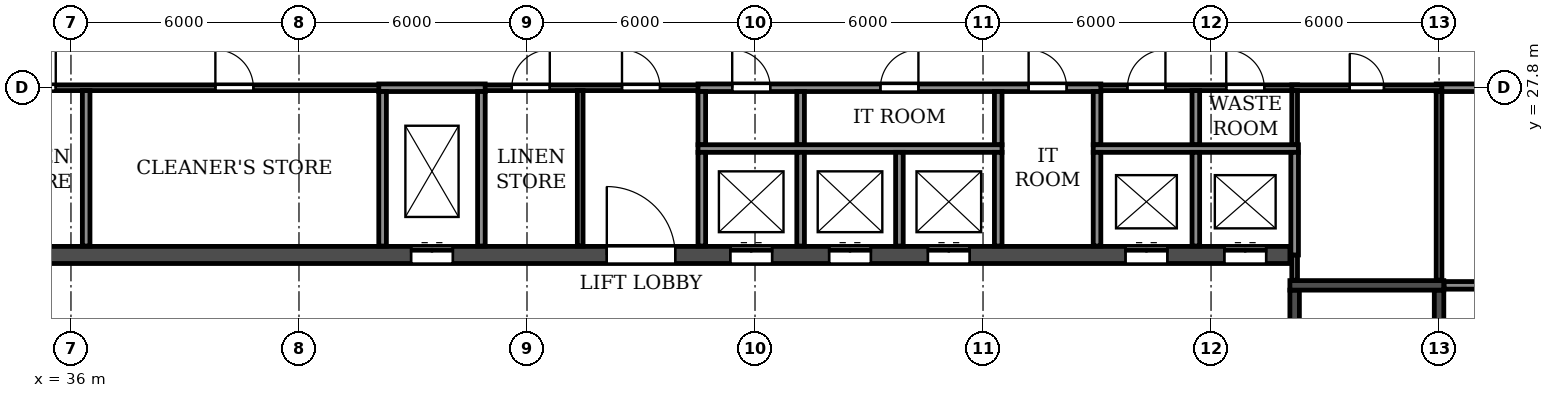
"""IFC4 building model, lengths in metres.
Left out: names, types, materials, properties, quantities, classifications, styles, units other than length and angle.
Written with IfcOpenShell. Run it as: python <this file> out.ifc"""

import sys

from ifc_helpers import new_model, si_unit, direction, frame, frame_2d, origin, place, context, subcontext, project, spatial, rectangle, extrude, element, fill, save


model = new_model("IFC4")
c1 = context("Model", 3, precision=1e-05, world=origin(), true_north=direction((0.0, 1.0)))
c2 = subcontext(c1, "Body", "Model", "MODEL_VIEW")
j1 = project(units=[si_unit("LENGTHUNIT", "METRE"), si_unit("PLANEANGLEUNIT", "RADIAN")], contexts=[c1])
p1 = place(None, origin())
s1 = spatial("IfcSite", under=j1, at=p1, CompositionType="ELEMENT")
p2 = place(p1, origin())
s2 = spatial("IfcBuilding", under=s1, at=p2, CompositionType="ELEMENT")
p3 = place(p2, origin())
s3 = spatial("IfcBuildingStorey", under=s2, at=p3, CompositionType="ELEMENT", Elevation=0.0)
p4 = place(p3, frame((33.925, 23.4, 0.0), z_axis=(0.0, 0.0, 1.0), x_axis=(1.0, 0.0, 0.0)))
e1 = element("IfcWall", 1, at=p4, inside=s3, PredefinedType="SOLIDWALL", context=c2, shape_type="SweptSolid", body=[
    extrude(rectangle(XDim=34.15, YDim=0.45, at=frame_2d((17.075, 0.0))), origin(), (0.0, 0.0, 1.0), 4.2),
])
p5 = place(p4, frame((16.175, 0.0, 0.0)))
e2 = element("IfcOpeningElement", 2, at=p5, cuts=e1, PredefinedType="OPENING", context=c2, shape_type="SweptSolid", body=[
    extrude(rectangle(XDim=1.8, YDim=2.1, at=frame_2d((0.9, 1.05))), frame((0.0, 0.235, 0.0), z_axis=(0.0, -1.0, 0.0), x_axis=(1.0, 0.0, 0.0)), (0.0, 0.0, 1.0), 0.47),
])
p6 = place(p4, frame((11.025, 0.0, 0.0)))
e3 = element("IfcOpeningElement", 3, at=p6, cuts=e1, PredefinedType="OPENING", context=c2, shape_type="SweptSolid", body=[
    extrude(rectangle(XDim=1.1, YDim=2.1, at=frame_2d((0.55, 1.05))), frame((0.0, 0.235, 0.0), z_axis=(0.0, -1.0, 0.0), x_axis=(1.0, 0.0, 0.0)), (0.0, 0.0, 1.0), 0.47),
])
p7 = place(p4, frame((19.425, 0.0, 0.0)))
e4 = element("IfcOpeningElement", 4, at=p7, cuts=e1, PredefinedType="OPENING", context=c2, shape_type="SweptSolid", body=[
    extrude(rectangle(XDim=1.1, YDim=2.1, at=frame_2d((0.55, 1.05))), frame((0.0, 0.235, 0.0), z_axis=(0.0, -1.0, 0.0), x_axis=(1.0, 0.0, 0.0)), (0.0, 0.0, 1.0), 0.47),
])
p8 = place(p4, frame((22.025, 0.0, 0.0)))
e5 = element("IfcOpeningElement", 5, at=p8, cuts=e1, PredefinedType="OPENING", context=c2, shape_type="SweptSolid", body=[
    extrude(rectangle(XDim=1.1, YDim=2.1, at=frame_2d((0.55, 1.05))), frame((0.0, 0.235, 0.0), z_axis=(0.0, -1.0, 0.0), x_axis=(1.0, 0.0, 0.0)), (0.0, 0.0, 1.0), 0.47),
])
p9 = place(p4, frame((24.625, 0.0, 0.0)))
e6 = element("IfcOpeningElement", 6, at=p9, cuts=e1, PredefinedType="OPENING", context=c2, shape_type="SweptSolid", body=[
    extrude(rectangle(XDim=1.1, YDim=2.1, at=frame_2d((0.55, 1.05))), frame((0.0, 0.235, 0.0), z_axis=(0.0, -1.0, 0.0), x_axis=(1.0, 0.0, 0.0)), (0.0, 0.0, 1.0), 0.47),
])
p10 = place(p4, frame((29.825, 0.0, 0.0)))
e7 = element("IfcOpeningElement", 7, at=p10, cuts=e1, PredefinedType="OPENING", context=c2, shape_type="SweptSolid", body=[
    extrude(rectangle(XDim=1.1, YDim=2.1, at=frame_2d((0.55, 1.05))), frame((0.0, 0.235, 0.0), z_axis=(0.0, -1.0, 0.0), x_axis=(1.0, 0.0, 0.0)), (0.0, 0.0, 1.0), 0.47),
])
p11 = place(p4, frame((32.425, 0.0, 0.0)))
e8 = element("IfcOpeningElement", 8, at=p11, cuts=e1, PredefinedType="OPENING", context=c2, shape_type="SweptSolid", body=[
    extrude(rectangle(XDim=1.1, YDim=2.1, at=frame_2d((0.55, 1.05))), frame((0.0, 0.235, 0.0), z_axis=(0.0, -1.0, 0.0), x_axis=(1.0, 0.0, 0.0)), (0.0, 0.0, 1.0), 0.47),
])
p12 = place(p3, frame((68.2, 14.6, 0.0), z_axis=(0.0, 0.0, 1.0), x_axis=(0.0, 1.0, 0.0)))
e9 = element("IfcWall", 9, at=p12, inside=s3, PredefinedType="SOLIDWALL", context=c2, shape_type="SweptSolid", body=[
    extrude(rectangle(XDim=7.875, YDim=0.25, at=frame_2d((3.938, 0.0))), origin(), (0.0, 0.0, 1.0), 4.2),
])
p13 = place(p12, frame((0.7, 0.0, 0.0)))
e10 = element("IfcOpeningElement", 10, at=p13, cuts=e9, PredefinedType="OPENING", context=c2, shape_type="SweptSolid", body=[
    extrude(rectangle(XDim=1.0, YDim=2.1, at=frame_2d((0.5, 1.05))), frame((0.0, 0.135, 0.0), z_axis=(0.0, -1.0, 0.0), x_axis=(1.0, 0.0, 0.0)), (0.0, 0.0, 1.0), 0.27),
])
p14 = place(p3, frame((72.0, 14.6, 0.0), z_axis=(0.0, 0.0, 1.0), x_axis=(0.0, 1.0, 0.0)))
e11 = element("IfcWall", 11, at=p14, inside=s3, PredefinedType="SOLIDWALL", context=c2, shape_type="SweptSolid", body=[
    extrude(rectangle(XDim=7.875, YDim=0.25, at=frame_2d((3.938, 0.0))), origin(), (0.0, 0.0, 1.0), 4.2),
])
p15 = place(p3, frame((68.075, 22.6, 0.0), z_axis=(0.0, 0.0, 1.0), x_axis=(1.0, 0.0, 0.0)))
e12 = element("IfcWall", 12, at=p15, inside=s3, PredefinedType="SOLIDWALL", context=c2, shape_type="SweptSolid", body=[
    extrude(rectangle(XDim=4.05, YDim=0.25, at=frame_2d((2.025, 0.0))), origin(), (0.0, 0.0, 1.0), 4.2),
])
p16 = place(p3, frame((33.725, 27.8, 0.0), z_axis=(0.0, 0.0, 1.0), x_axis=(1.0, 0.0, 0.0)))
e13 = element("IfcWall", 13, at=p16, inside=s3, PredefinedType="PARTITIONING", context=c2, shape_type="SweptSolid", body=[
    extrude(rectangle(XDim=10.575, YDim=0.15, at=frame_2d((5.288, 0.0))), origin(), (0.0, 0.0, 1.0), 4.2),
])
p17 = place(p16, frame((0.875, 0.0, 0.0)))
e14 = element("IfcOpeningElement", 14, at=p17, cuts=e13, PredefinedType="OPENING", context=c2, shape_type="SweptSolid", body=[
    extrude(rectangle(XDim=1.0, YDim=2.1, at=frame_2d((0.5, 1.05))), frame((0.0, 0.085, 0.0), z_axis=(0.0, -1.0, 0.0), x_axis=(1.0, 0.0, 0.0)), (0.0, 0.0, 1.0), 0.17),
])
p18 = place(p16, frame((6.075, 0.0, 0.0)))
e15 = element("IfcOpeningElement", 15, at=p18, cuts=e13, PredefinedType="OPENING", context=c2, shape_type="SweptSolid", body=[
    extrude(rectangle(XDim=1.0, YDim=2.1, at=frame_2d((0.5, 1.05))), frame((0.0, 0.085, 0.0), z_axis=(0.0, -1.0, 0.0), x_axis=(1.0, 0.0, 0.0)), (0.0, 0.0, 1.0), 0.17),
])
p19 = place(p3, frame((46.7, 27.8, 0.0), z_axis=(0.0, 0.0, 1.0), x_axis=(1.0, 0.0, 0.0)))
e16 = element("IfcWall", 16, at=p19, inside=s3, PredefinedType="PARTITIONING", context=c2, shape_type="SweptSolid", body=[
    extrude(rectangle(XDim=6.0, YDim=0.15, at=frame_2d((3.0, 0.0))), origin(), (0.0, 0.0, 1.0), 4.2),
])
p20 = place(p19, frame((0.9, 0.0, 0.0)))
e17 = element("IfcOpeningElement", 17, at=p20, cuts=e16, PredefinedType="OPENING", context=c2, shape_type="SweptSolid", body=[
    extrude(rectangle(XDim=1.0, YDim=2.1, at=frame_2d((0.5, 1.05))), frame((0.0, 0.085, 0.0), z_axis=(0.0, -1.0, 0.0), x_axis=(1.0, 0.0, 0.0)), (0.0, 0.0, 1.0), 0.17),
])
p21 = place(p19, frame((3.8, 0.0, 0.0)))
e18 = element("IfcOpeningElement", 18, at=p21, cuts=e16, PredefinedType="OPENING", context=c2, shape_type="SweptSolid", body=[
    extrude(rectangle(XDim=1.0, YDim=2.1, at=frame_2d((0.5, 1.05))), frame((0.0, 0.085, 0.0), z_axis=(0.0, -1.0, 0.0), x_axis=(1.0, 0.0, 0.0)), (0.0, 0.0, 1.0), 0.17),
])
p22 = place(p3, frame((62.9, 27.8, 0.0), z_axis=(0.0, 0.0, 1.0), x_axis=(1.0, 0.0, 0.0)))
e19 = element("IfcWall", 19, at=p22, inside=s3, PredefinedType="PARTITIONING", context=c2, shape_type="SweptSolid", body=[
    extrude(rectangle(XDim=5.375, YDim=0.15, at=frame_2d((2.688, 0.0))), origin(), (0.0, 0.0, 1.0), 4.2),
])
p23 = place(p22, frame((0.9, 0.0, 0.0)))
e20 = element("IfcOpeningElement", 20, at=p23, cuts=e19, PredefinedType="OPENING", context=c2, shape_type="SweptSolid", body=[
    extrude(rectangle(XDim=1.0, YDim=2.1, at=frame_2d((0.5, 1.05))), frame((0.0, 0.085, 0.0), z_axis=(0.0, -1.0, 0.0), x_axis=(1.0, 0.0, 0.0)), (0.0, 0.0, 1.0), 0.17),
])
p24 = place(p22, frame((3.5, 0.0, 0.0)))
e21 = element("IfcOpeningElement", 21, at=p24, cuts=e19, PredefinedType="OPENING", context=c2, shape_type="SweptSolid", body=[
    extrude(rectangle(XDim=1.0, YDim=2.1, at=frame_2d((0.5, 1.05))), frame((0.0, 0.085, 0.0), z_axis=(0.0, -1.0, 0.0), x_axis=(1.0, 0.0, 0.0)), (0.0, 0.0, 1.0), 0.17),
])
p25 = place(p3, frame((49.4, 23.635, 0.0), z_axis=(0.0, 0.0, 1.0), x_axis=(0.0, 1.0, 0.0)))
e22 = element("IfcWall", 22, at=p25, inside=s3, PredefinedType="PARTITIONING", context=c2, shape_type="SweptSolid", body=[
    extrude(rectangle(XDim=4.09, YDim=0.15, at=frame_2d((2.045, 0.0))), origin(), (0.0, 0.0, 1.0), 4.2),
])
p26 = place(p3, frame((72.135, 22.6, 0.0), z_axis=(0.0, 0.0, 1.0), x_axis=(1.0, 0.0, 0.0)))
e23 = element("IfcWall", 23, at=p26, inside=s3, PredefinedType="PARTITIONING", context=c2, shape_type="SweptSolid", body=[
    extrude(rectangle(XDim=5.13, YDim=0.2, at=frame_2d((2.565, 0.0))), origin(), (0.0, 0.0, 1.0), 4.2),
])
p27 = place(p3, frame((52.5, 27.8, 0.0), z_axis=(0.0, 0.0, 1.0), x_axis=(1.0, 0.0, 0.0)))
e24 = element("IfcWall", 24, at=p27, inside=s3, PredefinedType="PARTITIONING", context=c2, shape_type="SweptSolid", body=[
    extrude(rectangle(XDim=10.6, YDim=0.2, at=frame_2d((5.3, 0.0))), origin(), (0.0, 0.0, 1.0), 4.2),
])
p28 = place(p27, frame((0.9, 0.0, 0.0)))
e25 = element("IfcOpeningElement", 25, at=p28, cuts=e24, PredefinedType="OPENING", context=c2, shape_type="SweptSolid", body=[
    extrude(rectangle(XDim=1.0, YDim=2.1, at=frame_2d((0.5, 1.05))), frame((0.0, 0.11, 0.0), z_axis=(0.0, -1.0, 0.0), x_axis=(1.0, 0.0, 0.0)), (0.0, 0.0, 1.0), 0.22),
])
p29 = place(p27, frame((4.8, 0.0, 0.0)))
e26 = element("IfcOpeningElement", 26, at=p29, cuts=e24, PredefinedType="OPENING", context=c2, shape_type="SweptSolid", body=[
    extrude(rectangle(XDim=1.0, YDim=2.1, at=frame_2d((0.5, 1.05))), frame((0.0, 0.11, 0.0), z_axis=(0.0, -1.0, 0.0), x_axis=(1.0, 0.0, 0.0)), (0.0, 0.0, 1.0), 0.22),
])
p30 = place(p27, frame((8.7, 0.0, 0.0)))
e27 = element("IfcOpeningElement", 27, at=p30, cuts=e24, PredefinedType="OPENING", context=c2, shape_type="SweptSolid", body=[
    extrude(rectangle(XDim=1.0, YDim=2.1, at=frame_2d((0.5, 1.05))), frame((0.0, 0.11, 0.0), z_axis=(0.0, -1.0, 0.0), x_axis=(1.0, 0.0, 0.0)), (0.0, 0.0, 1.0), 0.22),
])
p31 = place(p3, frame((71.925, 27.8, 0.0), z_axis=(0.0, 0.0, 1.0), x_axis=(1.0, 0.0, 0.0)))
e28 = element("IfcWall", 28, at=p31, inside=s3, PredefinedType="PARTITIONING", context=c2, shape_type="SweptSolid", body=[
    extrude(rectangle(XDim=5.55, YDim=0.2, at=frame_2d((2.775, 0.0))), origin(), (0.0, 0.0, 1.0), 4.2),
])
p32 = place(p31, frame((2.275, 0.0, 0.0)))
e29 = element("IfcOpeningElement", 29, at=p32, cuts=e28, PredefinedType="OPENING", context=c2, shape_type="SweptSolid", body=[
    extrude(rectangle(XDim=1.0, YDim=2.1, at=frame_2d((0.5, 1.05))), frame((0.0, 0.11, 0.0), z_axis=(0.0, -1.0, 0.0), x_axis=(1.0, 0.0, 0.0)), (0.0, 0.0, 1.0), 0.22),
])
for number, where, z_axis, x_axis in (
    (30, (52.6, 26.3, 0.0), (0.0, 0.0, 1.0), (0.0, 1.0, 0.0)),
    (31, (55.2, 26.3, 0.0), (0.0, 0.0, 1.0), (0.0, 1.0, 0.0)),
    (32, (60.4, 26.3, 0.0), (0.0, 0.0, 1.0), (0.0, 1.0, 0.0)),
    (33, (63.0, 26.3, 0.0), (0.0, 0.0, 1.0), (0.0, 1.0, 0.0)),
):
    element("IfcWall", number, at=place(p3, frame(where, z_axis=z_axis, x_axis=x_axis)), inside=s3, PredefinedType="PARTITIONING", context=c2, shape_type="SweptSolid", body=[
        extrude(rectangle(XDim=1.4, YDim=0.2, at=frame_2d((0.7, 0.0))), origin(), (0.0, 0.0, 1.0), 4.2),
    ])
p33 = place(p3, frame((36.4, 23.635, 0.0), z_axis=(0.0, 0.0, 1.0), x_axis=(0.0, 1.0, 0.0)))
e34 = element("IfcWall", 34, at=p33, inside=s3, PredefinedType="PARTITIONING", context=c2, shape_type="SweptSolid", body=[
    extrude(rectangle(XDim=4.09, YDim=0.2, at=frame_2d((2.045, 0.0))), origin(), (0.0, 0.0, 1.0), 4.2),
])
p34 = place(p3, frame((65.6, 26.3, 0.0), z_axis=(0.0, 0.0, 1.0), x_axis=(0.0, 1.0, 0.0)))
e35 = element("IfcWall", 35, at=p34, inside=s3, PredefinedType="PARTITIONING", context=c2, shape_type="SweptSolid", body=[
    extrude(rectangle(XDim=1.425, YDim=0.2, at=frame_2d((0.712, 0.0))), origin(), (0.0, 0.0, 1.0), 4.2),
])
p35 = place(p3, frame((68.125, 27.8, 0.0), z_axis=(0.0, 0.0, 1.0), x_axis=(1.0, 0.0, 0.0)))
e36 = element("IfcWall", 36, at=p35, inside=s3, PredefinedType="PARTITIONING", context=c2, shape_type="SweptSolid", body=[
    extrude(rectangle(XDim=3.95, YDim=0.15, at=frame_2d((1.975, 0.0))), origin(), (0.0, 0.0, 1.0), 4.2),
])
p36 = place(p35, frame((1.525, 0.0, 0.0)))
e37 = element("IfcOpeningElement", 37, at=p36, cuts=e36, PredefinedType="OPENING", context=c2, shape_type="SweptSolid", body=[
    extrude(rectangle(XDim=0.9, YDim=2.1, at=frame_2d((0.45, 1.05))), frame((0.0, 0.085, 0.0), z_axis=(0.0, -1.0, 0.0), x_axis=(1.0, 0.0, 0.0)), (0.0, 0.0, 1.0), 0.17),
])
p37 = place(p3, frame((68.2, 22.735, 0.0), z_axis=(0.0, 0.0, 1.0), x_axis=(0.0, 1.0, 0.0)))
e38 = element("IfcWall", 38, at=p37, inside=s3, PredefinedType="PARTITIONING", context=c2, shape_type="SweptSolid", body=[
    extrude(rectangle(XDim=0.665, YDim=0.15, at=frame_2d((0.333, 0.0))), origin(), (0.0, 0.0, 1.0), 4.2),
])
p38 = place(p3, frame((68.2, 26.3, 0.0), z_axis=(0.0, 0.0, 1.0), x_axis=(0.0, 1.0, 0.0)))
e39 = element("IfcWall", 39, at=p38, inside=s3, PredefinedType="PARTITIONING", context=c2, shape_type="SweptSolid", body=[
    extrude(rectangle(XDim=1.425, YDim=0.15, at=frame_2d((0.712, 0.0))), origin(), (0.0, 0.0, 1.0), 4.2),
])
p39 = place(p3, frame((72.0, 22.735, 0.0), z_axis=(0.0, 0.0, 1.0), x_axis=(0.0, 1.0, 0.0)))
e40 = element("IfcWall", 40, at=p39, inside=s3, PredefinedType="PARTITIONING", context=c2, shape_type="SweptSolid", body=[
    extrude(rectangle(XDim=4.965, YDim=0.15, at=frame_2d((2.482, 0.0))), origin(), (0.0, 0.0, 1.0), 4.2),
])
p40 = place(p3, frame((52.5, 26.2, 0.0), z_axis=(0.0, 0.0, 1.0), x_axis=(1.0, 0.0, 0.0)))
e41 = element("IfcWall", 41, at=p40, inside=s3, PredefinedType="PARTITIONING", context=c2, shape_type="SweptSolid", body=[
    extrude(rectangle(XDim=8.0, YDim=0.2, at=frame_2d((4.0, 0.0))), origin(), (0.0, 0.0, 1.0), 4.2),
])
p41 = place(p3, frame((62.9, 26.2, 0.0), z_axis=(0.0, 0.0, 1.0), x_axis=(1.0, 0.0, 0.0)))
e42 = element("IfcWall", 42, at=p41, inside=s3, PredefinedType="PARTITIONING", context=c2, shape_type="SweptSolid", body=[
    extrude(rectangle(XDim=5.4, YDim=0.2, at=frame_2d((2.7, 0.0))), origin(), (0.0, 0.0, 1.0), 4.2),
])
p42 = place(p3, frame((44.1, 27.8, 0.0), z_axis=(0.0, 0.0, 1.0), x_axis=(1.0, 0.0, 0.0)))
e43 = element("IfcWall", 43, at=p42, inside=s3, PredefinedType="PARTITIONING", context=c2, shape_type="SweptSolid", body=[
    extrude(rectangle(XDim=2.8, YDim=0.2, at=frame_2d((1.4, 0.0))), origin(), (0.0, 0.0, 1.0), 4.2),
])
for number, where, z_axis, x_axis in (
    (44, (44.2, 23.635, 0.0), (0.0, 0.0, 1.0), (0.0, 1.0, 0.0)),
    (45, (46.8, 23.635, 0.0), (0.0, 0.0, 1.0), (0.0, 1.0, 0.0)),
):
    element("IfcWall", number, at=place(p3, frame(where, z_axis=z_axis, x_axis=x_axis)), inside=s3, PredefinedType="PARTITIONING", context=c2, shape_type="SweptSolid", body=[
        extrude(rectangle(XDim=4.065, YDim=0.2, at=frame_2d((2.032, 0.0))), origin(), (0.0, 0.0, 1.0), 4.2),
    ])
for number, where, z_axis, x_axis in (
    (46, (52.6, 23.635, 0.0), (0.0, 0.0, 1.0), (0.0, 1.0, 0.0)),
    (47, (55.2, 23.635, 0.0), (0.0, 0.0, 1.0), (0.0, 1.0, 0.0)),
    (48, (57.8, 23.635, 0.0), (0.0, 0.0, 1.0), (0.0, 1.0, 0.0)),
    (49, (60.4, 23.635, 0.0), (0.0, 0.0, 1.0), (0.0, 1.0, 0.0)),
    (50, (63.0, 23.635, 0.0), (0.0, 0.0, 1.0), (0.0, 1.0, 0.0)),
    (51, (65.6, 23.635, 0.0), (0.0, 0.0, 1.0), (0.0, 1.0, 0.0)),
):
    element("IfcWall", number, at=place(p3, frame(where, z_axis=z_axis, x_axis=x_axis)), inside=s3, PredefinedType="PARTITIONING", context=c2, shape_type="SweptSolid", body=[
        extrude(rectangle(XDim=2.465, YDim=0.2, at=frame_2d((1.232, 0.0))), origin(), (0.0, 0.0, 1.0), 4.2),
    ])
p43 = place(p3, frame((68.2, 23.4, 0.0), z_axis=(0.0, 0.0, 1.0), x_axis=(0.0, 1.0, 0.0)))
e52 = element("IfcWall", 52, at=p43, inside=s3, PredefinedType="PARTITIONING", context=c2, shape_type="SweptSolid", body=[
    extrude(rectangle(XDim=2.7, YDim=0.2, at=frame_2d((1.35, 0.0))), origin(), (0.0, 0.0, 1.0), 4.2),
])
p44 = place(p17, origin())
e53 = element("IfcDoor", 53, at=p44, inside=s3, OperationType="SINGLE_SWING_RIGHT", PredefinedType="DOOR", context=c2, shape_type="SweptSolid", body=[
    extrude(rectangle(XDim=1.0, YDim=2.1, at=frame_2d((0.5, 1.05))), frame((0.0, 0.025, 0.0), z_axis=(0.0, -1.0, 0.0), x_axis=(1.0, 0.0, 0.0)), (0.0, 0.0, 1.0), 0.05),
])
fill(e14, e53)
p45 = place(p18, origin())
e54 = element("IfcDoor", 54, at=p45, inside=s3, OperationType="SINGLE_SWING_LEFT", PredefinedType="DOOR", context=c2, shape_type="SweptSolid", body=[
    extrude(rectangle(XDim=1.0, YDim=2.1, at=frame_2d((0.5, 1.05))), frame((0.0, 0.025, 0.0), z_axis=(0.0, -1.0, 0.0), x_axis=(1.0, 0.0, 0.0)), (0.0, 0.0, 1.0), 0.05),
])
fill(e15, e54)
p46 = place(p20, origin())
e55 = element("IfcDoor", 55, at=p46, inside=s3, OperationType="SINGLE_SWING_RIGHT", PredefinedType="DOOR", context=c2, shape_type="SweptSolid", body=[
    extrude(rectangle(XDim=1.0, YDim=2.1, at=frame_2d((0.5, 1.05))), frame((0.0, 0.025, 0.0), z_axis=(0.0, -1.0, 0.0), x_axis=(1.0, 0.0, 0.0)), (0.0, 0.0, 1.0), 0.05),
])
fill(e17, e55)
p47 = place(p21, origin())
e56 = element("IfcDoor", 56, at=p47, inside=s3, OperationType="SINGLE_SWING_LEFT", PredefinedType="DOOR", context=c2, shape_type="SweptSolid", body=[
    extrude(rectangle(XDim=1.0, YDim=2.1, at=frame_2d((0.5, 1.05))), frame((0.0, 0.025, 0.0), z_axis=(0.0, -1.0, 0.0), x_axis=(1.0, 0.0, 0.0)), (0.0, 0.0, 1.0), 0.05),
])
fill(e18, e56)
p48 = place(p28, origin())
e57 = element("IfcDoor", 57, at=p48, inside=s3, OperationType="SINGLE_SWING_LEFT", PredefinedType="DOOR", context=c2, shape_type="SweptSolid", body=[
    extrude(rectangle(XDim=1.0, YDim=2.1, at=frame_2d((0.5, 1.05))), frame((0.0, 0.025, 0.0), z_axis=(0.0, -1.0, 0.0), x_axis=(1.0, 0.0, 0.0)), (0.0, 0.0, 1.0), 0.05),
])
fill(e25, e57)
p49 = place(p29, origin())
e58 = element("IfcDoor", 58, at=p49, inside=s3, OperationType="SINGLE_SWING_RIGHT", PredefinedType="DOOR", context=c2, shape_type="SweptSolid", body=[
    extrude(rectangle(XDim=1.0, YDim=2.1, at=frame_2d((0.5, 1.05))), frame((0.0, 0.025, 0.0), z_axis=(0.0, -1.0, 0.0), x_axis=(1.0, 0.0, 0.0)), (0.0, 0.0, 1.0), 0.05),
])
fill(e26, e58)
p50 = place(p30, origin())
e59 = element("IfcDoor", 59, at=p50, inside=s3, OperationType="SINGLE_SWING_LEFT", PredefinedType="DOOR", context=c2, shape_type="SweptSolid", body=[
    extrude(rectangle(XDim=1.0, YDim=2.1, at=frame_2d((0.5, 1.05))), frame((0.0, 0.025, 0.0), z_axis=(0.0, -1.0, 0.0), x_axis=(1.0, 0.0, 0.0)), (0.0, 0.0, 1.0), 0.05),
])
fill(e27, e59)
p51 = place(p23, origin())
e60 = element("IfcDoor", 60, at=p51, inside=s3, OperationType="SINGLE_SWING_RIGHT", PredefinedType="DOOR", context=c2, shape_type="SweptSolid", body=[
    extrude(rectangle(XDim=1.0, YDim=2.1, at=frame_2d((0.5, 1.05))), frame((0.0, 0.025, 0.0), z_axis=(0.0, -1.0, 0.0), x_axis=(1.0, 0.0, 0.0)), (0.0, 0.0, 1.0), 0.05),
])
fill(e20, e60)
p52 = place(p24, origin())
e61 = element("IfcDoor", 61, at=p52, inside=s3, OperationType="SINGLE_SWING_LEFT", PredefinedType="DOOR", context=c2, shape_type="SweptSolid", body=[
    extrude(rectangle(XDim=1.0, YDim=2.1, at=frame_2d((0.5, 1.05))), frame((0.0, 0.025, 0.0), z_axis=(0.0, -1.0, 0.0), x_axis=(1.0, 0.0, 0.0)), (0.0, 0.0, 1.0), 0.05),
])
fill(e21, e61)
p53 = place(p36, origin())
e62 = element("IfcDoor", 62, at=p53, inside=s3, OperationType="SINGLE_SWING_LEFT", PredefinedType="DOOR", context=c2, shape_type="SweptSolid", body=[
    extrude(rectangle(XDim=0.9, YDim=2.1, at=frame_2d((0.45, 1.05))), frame((0.0, 0.025, 0.0), z_axis=(0.0, -1.0, 0.0), x_axis=(1.0, 0.0, 0.0)), (0.0, 0.0, 1.0), 0.05),
])
fill(e37, e62)
p54 = place(p5, origin())
e63 = element("IfcDoor", 63, at=p54, inside=s3, OperationType="DOUBLE_DOOR_SINGLE_SWING", PredefinedType="DOOR", context=c2, shape_type="SweptSolid", body=[
    extrude(rectangle(XDim=1.8, YDim=2.1, at=frame_2d((0.9, 1.05))), frame((0.0, 0.025, 0.0), z_axis=(0.0, -1.0, 0.0), x_axis=(1.0, 0.0, 0.0)), (0.0, 0.0, 1.0), 0.05),
])
fill(e2, e63)
p55 = place(p6, origin())
e64 = element("IfcDoor", 64, at=p55, inside=s3, OperationType="DOUBLE_DOOR_SLIDING", PredefinedType="DOOR", context=c2, shape_type="SweptSolid", body=[
    extrude(rectangle(XDim=1.1, YDim=2.1, at=frame_2d((0.55, 1.05))), frame((0.0, 0.025, 0.0), z_axis=(0.0, -1.0, 0.0), x_axis=(1.0, 0.0, 0.0)), (0.0, 0.0, 1.0), 0.05),
])
fill(e3, e64)
p56 = place(p7, origin())
e65 = element("IfcDoor", 65, at=p56, inside=s3, OperationType="DOUBLE_DOOR_SLIDING", PredefinedType="DOOR", context=c2, shape_type="SweptSolid", body=[
    extrude(rectangle(XDim=1.1, YDim=2.1, at=frame_2d((0.55, 1.05))), frame((0.0, 0.025, 0.0), z_axis=(0.0, -1.0, 0.0), x_axis=(1.0, 0.0, 0.0)), (0.0, 0.0, 1.0), 0.05),
])
fill(e4, e65)
p57 = place(p8, origin())
e66 = element("IfcDoor", 66, at=p57, inside=s3, OperationType="DOUBLE_DOOR_SLIDING", PredefinedType="DOOR", context=c2, shape_type="SweptSolid", body=[
    extrude(rectangle(XDim=1.1, YDim=2.1, at=frame_2d((0.55, 1.05))), frame((0.0, 0.025, 0.0), z_axis=(0.0, -1.0, 0.0), x_axis=(1.0, 0.0, 0.0)), (0.0, 0.0, 1.0), 0.05),
])
fill(e5, e66)
p58 = place(p9, origin())
e67 = element("IfcDoor", 67, at=p58, inside=s3, OperationType="DOUBLE_DOOR_SLIDING", PredefinedType="DOOR", context=c2, shape_type="SweptSolid", body=[
    extrude(rectangle(XDim=1.1, YDim=2.1, at=frame_2d((0.55, 1.05))), frame((0.0, 0.025, 0.0), z_axis=(0.0, -1.0, 0.0), x_axis=(1.0, 0.0, 0.0)), (0.0, 0.0, 1.0), 0.05),
])
fill(e6, e67)
p59 = place(p10, origin())
e68 = element("IfcDoor", 68, at=p59, inside=s3, OperationType="DOUBLE_DOOR_SLIDING", PredefinedType="DOOR", context=c2, shape_type="SweptSolid", body=[
    extrude(rectangle(XDim=1.1, YDim=2.1, at=frame_2d((0.55, 1.05))), frame((0.0, 0.025, 0.0), z_axis=(0.0, -1.0, 0.0), x_axis=(1.0, 0.0, 0.0)), (0.0, 0.0, 1.0), 0.05),
])
fill(e7, e68)
p60 = place(p11, origin())
e69 = element("IfcDoor", 69, at=p60, inside=s3, OperationType="DOUBLE_DOOR_SLIDING", PredefinedType="DOOR", context=c2, shape_type="SweptSolid", body=[
    extrude(rectangle(XDim=1.1, YDim=2.1, at=frame_2d((0.55, 1.05))), frame((0.0, 0.025, 0.0), z_axis=(0.0, -1.0, 0.0), x_axis=(1.0, 0.0, 0.0)), (0.0, 0.0, 1.0), 0.05),
])
fill(e8, e69)
save(model, sys.argv[1])
